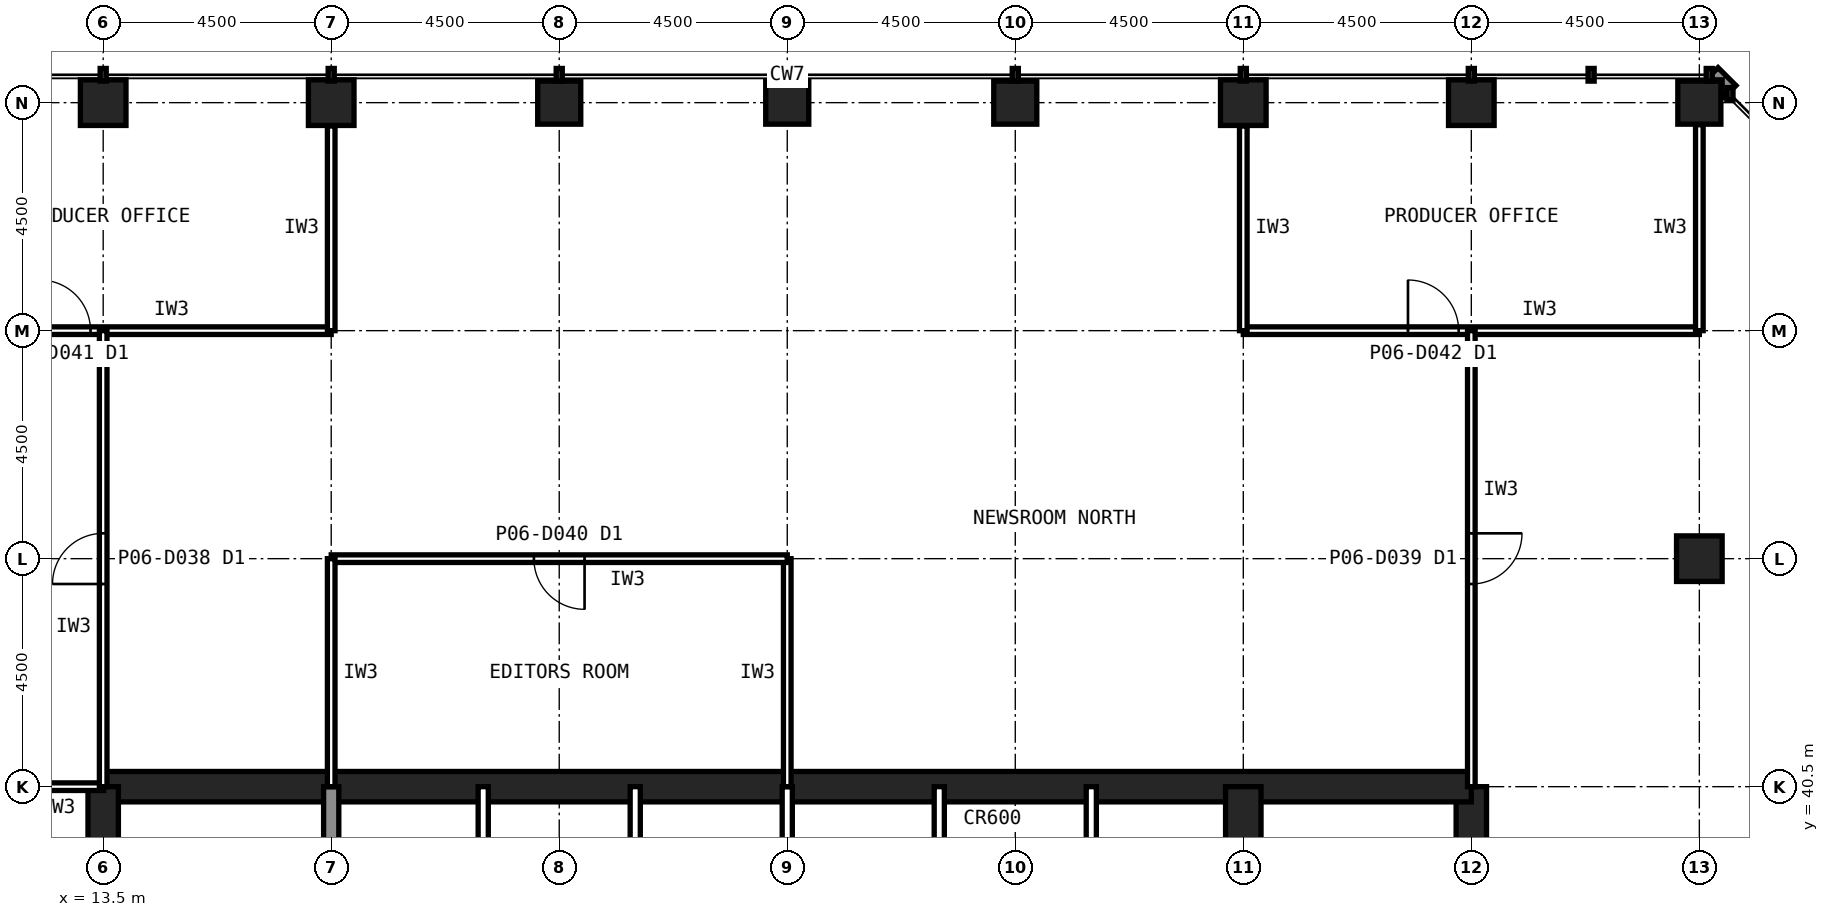
"""IFC4 building model, lengths in metres.
Left out: names, types, materials, properties, quantities, classifications, styles, units other than length and angle.
Written with IfcOpenShell. Run it as: python <this file> out.ifc"""

import sys

from ifc_helpers import new_model, si_unit, direction, frame, frame_2d, origin, origin_2d, place, context, subcontext, project, spatial, rectangle, hollow_rectangle, extrude, element, fill, save


model = new_model("IFC4")
c1 = context("Model", 3, precision=1e-05, world=origin(), true_north=direction((0.0, 1.0)))
c2 = subcontext(c1, "Body", "Model", "MODEL_VIEW")
j1 = project(units=[si_unit("LENGTHUNIT", "METRE"), si_unit("PLANEANGLEUNIT", "RADIAN")], contexts=[c1])
p1 = place(None, origin())
s1 = spatial("IfcSite", under=j1, at=p1, CompositionType="ELEMENT")
p2 = place(p1, origin())
s2 = spatial("IfcBuilding", under=s1, at=p2, CompositionType="ELEMENT")
p3 = place(p2, frame((0.0, 0.0, 29.0)))
s3 = spatial("IfcBuildingStorey", under=s2, at=p3, CompositionType="ELEMENT", Elevation=29.0)
p4 = place(p3, frame((45.0, 54.0, 0.0), z_axis=(0.0, 0.0, 1.0), x_axis=(1.0, 0.0, 0.0)))
e1 = element("IfcColumn", 1, at=p4, inside=s3, PredefinedType="COLUMN", context=c2, shape_type="SweptSolid", body=[
    extrude(hollow_rectangle(XDim=0.85, YDim=0.85, WallThickness=0.05, at=origin_2d()), origin(), (0.0, 0.0, 1.0), 4.2),
])
for number, where, z_axis, x_axis in (
    (2, (40.5, 54.0, 0.0), (0.0, 0.0, 1.0), (1.0, 0.0, 0.0)),
    (3, (36.0, 54.0, 0.0), (0.0, 0.0, 1.0), (1.0, 0.0, 0.0)),
):
    element("IfcColumn", number, at=place(p3, frame(where, z_axis=z_axis, x_axis=x_axis)), inside=s3, PredefinedType="COLUMN", context=c2, shape_type="SweptSolid", body=[
        extrude(hollow_rectangle(XDim=0.9, YDim=0.9, WallThickness=0.063, at=origin_2d()), origin(), (0.0, 0.0, 1.0), 4.2),
    ])
for number, where, z_axis, x_axis in (
    (4, (31.5, 54.0, 0.0), (0.0, 0.0, 1.0), (1.0, 0.0, 0.0)),
    (5, (27.0, 54.0, 0.0), (0.0, 0.0, 1.0), (1.0, 0.0, 0.0)),
    (6, (22.5, 54.0, 0.0), (0.0, 0.0, 1.0), (1.0, 0.0, 0.0)),
):
    element("IfcColumn", number, at=place(p3, frame(where, z_axis=z_axis, x_axis=x_axis)), inside=s3, PredefinedType="COLUMN", context=c2, shape_type="SweptSolid", body=[
        extrude(hollow_rectangle(XDim=0.85, YDim=0.85, WallThickness=0.05, at=origin_2d()), origin(), (0.0, 0.0, 1.0), 4.2),
    ])
for number, where, z_axis, x_axis in (
    (7, (18.0, 54.0, 0.0), (0.0, 0.0, 1.0), (1.0, 0.0, 0.0)),
    (8, (13.5, 54.0, 0.0), (0.0, 0.0, 1.0), (1.0, 0.0, 0.0)),
    (9, (45.0, 45.0, 0.0), (0.0, 0.0, 1.0), (1.0, 0.0, 0.0)),
):
    element("IfcColumn", number, at=place(p3, frame(where, z_axis=z_axis, x_axis=x_axis)), inside=s3, PredefinedType="COLUMN", context=c2, shape_type="SweptSolid", body=[
        extrude(hollow_rectangle(XDim=0.9, YDim=0.9, WallThickness=0.063, at=origin_2d()), origin(), (0.0, 0.0, 1.0), 4.2),
    ])
p5 = place(p3, frame((40.5, 13.5, 0.0), z_axis=(0.0, 0.0, 1.0), x_axis=(0.0, 1.0, 0.0)))
e10 = element("IfcWall", 10, at=p5, inside=s3, PredefinedType="SHEAR", context=c2, shape_type="SweptSolid", body=[
    extrude(rectangle(XDim=27.0, YDim=0.6, at=frame_2d((13.5, 0.0))), origin(), (0.0, 0.0, 1.0), 4.2),
])
p6 = place(p5, frame((5.85, 0.0, 0.0)))
e11 = element("IfcOpeningElement", 11, at=p6, cuts=e10, PredefinedType="OPENING", context=c2, shape_type="SweptSolid", body=[
    extrude(rectangle(XDim=1.8, YDim=2.1, at=frame_2d((0.9, 1.05))), frame((0.0, 0.31, 0.0), z_axis=(0.0, -1.0, 0.0), x_axis=(1.0, 0.0, 0.0)), (0.0, 0.0, 1.0), 0.62),
])
p7 = place(p5, frame((19.65, 0.0, 0.0)))
e12 = element("IfcOpeningElement", 12, at=p7, cuts=e10, PredefinedType="OPENING", context=c2, shape_type="SweptSolid", body=[
    extrude(rectangle(XDim=1.2, YDim=2.1, at=frame_2d((0.6, 1.05))), frame((0.0, 0.31, 0.0), z_axis=(0.0, -1.0, 0.0), x_axis=(1.0, 0.0, 0.0)), (0.0, 0.0, 1.0), 0.62),
])
p8 = place(p3, frame((40.5, 40.5, 0.0), z_axis=(0.0, 0.0, 1.0), x_axis=(-1.0, 0.0, 0.0)))
e13 = element("IfcWall", 13, at=p8, inside=s3, PredefinedType="SHEAR", context=c2, shape_type="SweptSolid", body=[
    extrude(rectangle(XDim=27.0, YDim=0.6, at=frame_2d((13.5, 0.0))), origin(), (0.0, 0.0, 1.0), 4.2),
])
p9 = place(p3, frame((13.5, 40.5, 0.0), z_axis=(0.0, 0.0, 1.0), x_axis=(0.0, -1.0, 0.0)))
e14 = element("IfcWall", 14, at=p9, inside=s3, PredefinedType="SHEAR", context=c2, shape_type="SweptSolid", body=[
    extrude(rectangle(XDim=27.0, YDim=0.6, at=frame_2d((13.5, 0.0))), origin(), (0.0, 0.0, 1.0), 4.2),
])
p10 = place(p9, frame((19.65, 0.0, 0.0)))
e15 = element("IfcOpeningElement", 15, at=p10, cuts=e14, PredefinedType="OPENING", context=c2, shape_type="SweptSolid", body=[
    extrude(rectangle(XDim=1.2, YDim=2.1, at=frame_2d((0.6, 1.05))), frame((0.0, 0.31, 0.0), z_axis=(0.0, -1.0, 0.0), x_axis=(1.0, 0.0, 0.0)), (0.0, 0.0, 1.0), 0.62),
])
p11 = place(p9, frame((5.85, 0.0, 0.0)))
e16 = element("IfcOpeningElement", 16, at=p11, cuts=e14, PredefinedType="OPENING", context=c2, shape_type="SweptSolid", body=[
    extrude(rectangle(XDim=1.8, YDim=2.1, at=frame_2d((0.9, 1.05))), frame((0.0, 0.31, 0.0), z_axis=(0.0, -1.0, 0.0), x_axis=(1.0, 0.0, 0.0)), (0.0, 0.0, 1.0), 0.62),
])
p12 = place(p3, frame((18.0, 36.0, 0.0), z_axis=(0.0, 0.0, 1.0), x_axis=(0.0, 1.0, 0.0)))
e17 = element("IfcWall", 17, at=p12, inside=s3, PredefinedType="SOLIDWALL", context=c2, shape_type="SweptSolid", body=[
    extrude(rectangle(XDim=4.5, YDim=0.3, at=frame_2d((2.25, 0.0))), origin(), (0.0, 0.0, 1.0), 4.04),
])
p13 = place(p3, frame((36.0, 22.5, 0.0), z_axis=(0.0, 0.0, 1.0), x_axis=(0.0, 1.0, 0.0)))
e18 = element("IfcWall", 18, at=p13, inside=s3, PredefinedType="SHEAR", context=c2, shape_type="SweptSolid", body=[
    extrude(rectangle(XDim=18.0, YDim=0.7, at=frame_2d((9.0, 0.0))), origin(), (0.0, 0.0, 1.0), 4.2),
])
for number, where, z_axis, x_axis in (
    (19, (21.0, 36.0, 0.0), (0.0, 0.0, 1.0), (0.0, 1.0, 0.0)),
    (20, (24.0, 36.0, 0.0), (0.0, 0.0, 1.0), (0.0, 1.0, 0.0)),
    (21, (27.0, 36.0, 0.0), (0.0, 0.0, 1.0), (0.0, 1.0, 0.0)),
    (22, (30.0, 36.0, 0.0), (0.0, 0.0, 1.0), (0.0, 1.0, 0.0)),
    (23, (33.0, 36.0, 0.0), (0.0, 0.0, 1.0), (0.0, 1.0, 0.0)),
):
    element("IfcWall", number, at=place(p3, frame(where, z_axis=z_axis, x_axis=x_axis)), inside=s3, PredefinedType="PARTITIONING", context=c2, shape_type="SweptSolid", body=[
        extrude(rectangle(XDim=4.5, YDim=0.2, at=frame_2d((2.25, 0.0))), origin(), (0.0, 0.0, 1.0), 4.04),
    ])
p14 = place(p3, frame((13.51, 40.5, 0.0), z_axis=(0.0, 0.0, 1.0), x_axis=(-1.0, 0.0, 0.0)))
e24 = element("IfcWall", 24, at=p14, inside=s3, PredefinedType="PARTITIONING", context=c2, shape_type="SweptSolid", body=[
    extrude(rectangle(XDim=1.81, YDim=0.15, at=frame_2d((0.905, 0.0))), origin(), (0.0, 0.0, 1.0), 3.189),
])
p15 = place(p3, frame((27.0, 40.5, 0.0), z_axis=(0.0, 0.0, 1.0), x_axis=(0.0, 1.0, 0.0)))
e25 = element("IfcWall", 25, at=p15, inside=s3, PredefinedType="PARTITIONING", context=c2, shape_type="SweptSolid", body=[
    extrude(rectangle(XDim=4.5, YDim=0.15, at=frame_2d((2.25, 0.0))), origin(), (0.0, 0.0, 1.0), 3.189),
])
p16 = place(p3, frame((27.0, 45.0, 0.0), z_axis=(0.0, 0.0, 1.0), x_axis=(-1.0, 0.0, 0.0)))
e26 = element("IfcWall", 26, at=p16, inside=s3, PredefinedType="PARTITIONING", context=c2, shape_type="SweptSolid", body=[
    extrude(rectangle(XDim=9.0, YDim=0.15, at=frame_2d((4.5, 0.0))), origin(), (0.0, 0.0, 1.0), 4.04),
])
p17 = place(p16, frame((4.0, 0.0, 0.0)))
e27 = element("IfcOpeningElement", 27, at=p17, cuts=e26, PredefinedType="OPENING", context=c2, shape_type="SweptSolid", body=[
    extrude(rectangle(XDim=1.0, YDim=2.1, at=frame_2d((0.5, 1.05))), frame((0.0, 0.085, 0.0), z_axis=(0.0, -1.0, 0.0), x_axis=(1.0, 0.0, 0.0)), (0.0, 0.0, 1.0), 0.17),
])
p18 = place(p3, frame((18.0, 45.0, 0.0), z_axis=(0.0, 0.0, 1.0), x_axis=(0.0, -1.0, 0.0)))
e28 = element("IfcWall", 28, at=p18, inside=s3, PredefinedType="PARTITIONING", context=c2, shape_type="SweptSolid", body=[
    extrude(rectangle(XDim=4.5, YDim=0.15, at=frame_2d((2.25, 0.0))), origin(), (0.0, 0.0, 1.0), 3.189),
])
p19 = place(p3, frame((9.0, 49.5, 0.0), z_axis=(0.0, 0.0, 1.0), x_axis=(1.0, 0.0, 0.0)))
e29 = element("IfcWall", 29, at=p19, inside=s3, PredefinedType="PARTITIONING", context=c2, shape_type="SweptSolid", body=[
    extrude(rectangle(XDim=9.0, YDim=0.15, at=frame_2d((4.5, 0.0))), origin(), (0.0, 0.0, 1.0), 4.04),
])
p20 = place(p19, frame((3.25, 0.0, 0.0)))
e30 = element("IfcOpeningElement", 30, at=p20, cuts=e29, PredefinedType="OPENING", context=c2, shape_type="SweptSolid", body=[
    extrude(rectangle(XDim=1.0, YDim=2.1, at=frame_2d((0.5, 1.05))), frame((0.0, 0.085, 0.0), z_axis=(0.0, -1.0, 0.0), x_axis=(1.0, 0.0, 0.0)), (0.0, 0.0, 1.0), 0.17),
])
p21 = place(p3, frame((18.0, 49.5, 0.0), z_axis=(0.0, 0.0, 1.0), x_axis=(0.0, 1.0, 0.0)))
e31 = element("IfcWall", 31, at=p21, inside=s3, PredefinedType="PARTITIONING", context=c2, shape_type="SweptSolid", body=[
    extrude(rectangle(XDim=4.04, YDim=0.15, at=frame_2d((2.02, 0.0))), origin(), (0.0, 0.0, 1.0), 3.189),
])
p22 = place(p3, frame((36.0, 49.5, 0.0), z_axis=(0.0, 0.0, 1.0), x_axis=(1.0, 0.0, 0.0)))
e32 = element("IfcWall", 32, at=p22, inside=s3, PredefinedType="PARTITIONING", context=c2, shape_type="SweptSolid", body=[
    extrude(rectangle(XDim=9.0, YDim=0.15, at=frame_2d((4.5, 0.0))), origin(), (0.0, 0.0, 1.0), 4.04),
])
p23 = place(p22, frame((3.25, 0.0, 0.0)))
e33 = element("IfcOpeningElement", 33, at=p23, cuts=e32, PredefinedType="OPENING", context=c2, shape_type="SweptSolid", body=[
    extrude(rectangle(XDim=1.0, YDim=2.1, at=frame_2d((0.5, 1.05))), frame((0.0, 0.085, 0.0), z_axis=(0.0, -1.0, 0.0), x_axis=(1.0, 0.0, 0.0)), (0.0, 0.0, 1.0), 0.17),
])
p24 = place(p3, frame((45.0, 49.5, 0.0), z_axis=(0.0, 0.0, 1.0), x_axis=(0.0, 1.0, 0.0)))
e34 = element("IfcWall", 34, at=p24, inside=s3, PredefinedType="PARTITIONING", context=c2, shape_type="SweptSolid", body=[
    extrude(rectangle(XDim=4.065, YDim=0.15, at=frame_2d((2.032, 0.0))), origin(), (0.0, 0.0, 1.0), 3.429),
])
p25 = place(p3, frame((36.0, 53.54, 0.0), z_axis=(0.0, 0.0, 1.0), x_axis=(0.0, -1.0, 0.0)))
e35 = element("IfcWall", 35, at=p25, inside=s3, PredefinedType="PARTITIONING", context=c2, shape_type="SweptSolid", body=[
    extrude(rectangle(XDim=4.04, YDim=0.15, at=frame_2d((2.02, 0.0))), origin(), (0.0, 0.0, 1.0), 3.189),
])
p26 = place(p3, frame((40.5, 49.5, 0.0), z_axis=(0.0, 0.0, 1.0), x_axis=(0.0, -1.0, 0.0)))
e36 = element("IfcWall", 36, at=p26, inside=s3, PredefinedType="PARTITIONING", context=c2, shape_type="SweptSolid", body=[
    extrude(rectangle(XDim=9.0, YDim=0.15, at=frame_2d((4.5, 0.0))), origin(), (0.0, 0.0, 1.0), 3.189),
])
p27 = place(p26, frame((4.0, 0.0, 0.0)))
e37 = element("IfcOpeningElement", 37, at=p27, cuts=e36, PredefinedType="OPENING", context=c2, shape_type="SweptSolid", body=[
    extrude(rectangle(XDim=1.0, YDim=2.1, at=frame_2d((0.5, 1.05))), frame((0.0, 0.085, 0.0), z_axis=(0.0, -1.0, 0.0), x_axis=(1.0, 0.0, 0.0)), (0.0, 0.0, 1.0), 0.17),
])
p28 = place(p3, frame((13.5, 40.5, 0.0), z_axis=(0.0, 0.0, 1.0), x_axis=(0.0, 1.0, 0.0)))
e38 = element("IfcWall", 38, at=p28, inside=s3, PredefinedType="PARTITIONING", context=c2, shape_type="SweptSolid", body=[
    extrude(rectangle(XDim=9.0, YDim=0.15, at=frame_2d((4.5, 0.0))), origin(), (0.0, 0.0, 1.0), 3.189),
])
p29 = place(p28, frame((4.0, 0.0, 0.0)))
e39 = element("IfcOpeningElement", 39, at=p29, cuts=e38, PredefinedType="OPENING", context=c2, shape_type="SweptSolid", body=[
    extrude(rectangle(XDim=1.0, YDim=2.1, at=frame_2d((0.5, 1.05))), frame((0.0, 0.085, 0.0), z_axis=(0.0, -1.0, 0.0), x_axis=(1.0, 0.0, 0.0)), (0.0, 0.0, 1.0), 0.17),
])
p30 = place(p17, origin())
e40 = element("IfcDoor", 40, at=p30, inside=s3, OperationType="SINGLE_SWING_LEFT", PredefinedType="DOOR", context=c2, shape_type="SweptSolid", body=[
    extrude(rectangle(XDim=1.0, YDim=2.1, at=frame_2d((0.5, 1.05))), frame((0.0, 0.025, 0.0), z_axis=(0.0, -1.0, 0.0), x_axis=(1.0, 0.0, 0.0)), (0.0, 0.0, 1.0), 0.05),
])
fill(e27, e40)
p31 = place(p20, origin())
e41 = element("IfcDoor", 41, at=p31, inside=s3, OperationType="SINGLE_SWING_LEFT", PredefinedType="DOOR", context=c2, shape_type="SweptSolid", body=[
    extrude(rectangle(XDim=1.0, YDim=2.1, at=frame_2d((0.5, 1.05))), frame((0.0, 0.025, 0.0), z_axis=(0.0, -1.0, 0.0), x_axis=(1.0, 0.0, 0.0)), (0.0, 0.0, 1.0), 0.05),
])
fill(e30, e41)
p32 = place(p23, origin())
e42 = element("IfcDoor", 42, at=p32, inside=s3, OperationType="SINGLE_SWING_LEFT", PredefinedType="DOOR", context=c2, shape_type="SweptSolid", body=[
    extrude(rectangle(XDim=1.0, YDim=2.1, at=frame_2d((0.5, 1.05))), frame((0.0, 0.025, 0.0), z_axis=(0.0, -1.0, 0.0), x_axis=(1.0, 0.0, 0.0)), (0.0, 0.0, 1.0), 0.05),
])
fill(e33, e42)
p33 = place(p27, origin())
e43 = element("IfcDoor", 43, at=p33, inside=s3, OperationType="SINGLE_SWING_LEFT", PredefinedType="DOOR", context=c2, shape_type="SweptSolid", body=[
    extrude(rectangle(XDim=1.0, YDim=2.1, at=frame_2d((0.5, 1.05))), frame((0.0, 0.025, 0.0), z_axis=(0.0, -1.0, 0.0), x_axis=(1.0, 0.0, 0.0)), (0.0, 0.0, 1.0), 0.05),
])
fill(e37, e43)
p34 = place(p29, origin())
e44 = element("IfcDoor", 44, at=p34, inside=s3, OperationType="SINGLE_SWING_LEFT", PredefinedType="DOOR", context=c2, shape_type="SweptSolid", body=[
    extrude(rectangle(XDim=1.0, YDim=2.1, at=frame_2d((0.5, 1.05))), frame((0.0, 0.025, 0.0), z_axis=(0.0, -1.0, 0.0), x_axis=(1.0, 0.0, 0.0)), (0.0, 0.0, 1.0), 0.05),
])
fill(e39, e44)
save(model, sys.argv[1])
